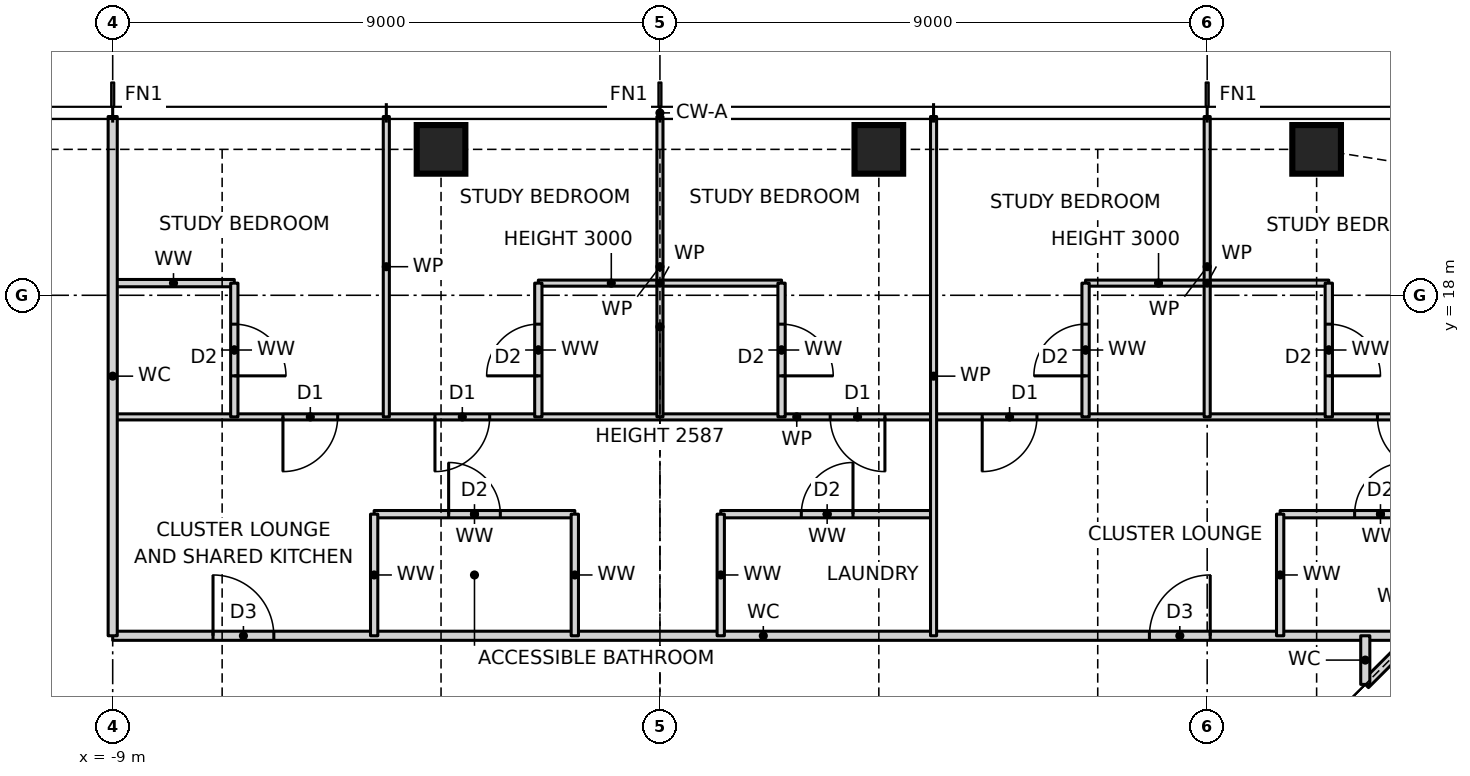
"""IFC4 building model, lengths in metres.
Left out: names, types, materials, properties, quantities, classifications, styles, units other than length and angle.
Written with IfcOpenShell. Run it as: python <this file> out.ifc"""

import sys

from ifc_helpers import new_model, si_unit, direction, frame, frame_2d, origin, origin_2d, place, context, subcontext, project, spatial, rectangle, hollow_rectangle, extrude, element, fill, save


model = new_model("IFC4")
c1 = context("Model", 3, precision=1e-05, world=origin(), true_north=direction((0.0, 1.0)))
c2 = subcontext(c1, "Body", "Model", "MODEL_VIEW")
j1 = project(units=[si_unit("LENGTHUNIT", "METRE"), si_unit("PLANEANGLEUNIT", "RADIAN")], contexts=[c1])
p1 = place(None, origin())
s1 = spatial("IfcSite", under=j1, at=p1, CompositionType="ELEMENT")
p2 = place(p1, origin())
s2 = spatial("IfcBuilding", under=s1, at=p2, CompositionType="ELEMENT")
p3 = place(p2, frame((0.0, 0.0, 115.5)))
s3 = spatial("IfcBuildingStorey", under=s2, at=p3, CompositionType="ELEMENT", Elevation=115.5)
for number, where, z_axis, x_axis in (
    (1, (10.8, 20.4, 0.0), (0.0, 0.0, 1.0), (1.0, 0.0, 0.0)),
    (2, (3.6, 20.4, 0.0), (0.0, 0.0, 1.0), (1.0, 0.0, 0.0)),
    (3, (-3.6, 20.4, 0.0), (0.0, 0.0, 1.0), (1.0, 0.0, 0.0)),
):
    element("IfcColumn", number, at=place(p3, frame(where, z_axis=z_axis, x_axis=x_axis)), inside=s3, PredefinedType="COLUMN", context=c2, shape_type="SweptSolid", body=[
        extrude(hollow_rectangle(XDim=0.8, YDim=0.8, WallThickness=0.07, at=origin_2d()), origin(), (0.0, 0.0, 1.0), 3.5),
    ])
p4 = place(p3, frame((-9.0, 12.4, 0.0), z_axis=(0.0, 0.0, 1.0), x_axis=(1.0, 0.0, 0.0)))
e4 = element("IfcWall", 4, at=p4, inside=s3, PredefinedType="PARTITIONING", context=c2, shape_type="SweptSolid", body=[
    extrude(rectangle(XDim=21.4, YDim=0.15, at=frame_2d((10.7, 0.0))), origin(), (0.0, 0.0, 1.0), 3.27),
])
p5 = place(p4, frame((17.05, 0.0, 0.0)))
e5 = element("IfcOpeningElement", 5, at=p5, cuts=e4, PredefinedType="OPENING", context=c2, shape_type="SweptSolid", body=[
    extrude(rectangle(XDim=1.0, YDim=2.1, at=frame_2d((0.5, 1.05))), frame((0.0, 0.085, 0.0), z_axis=(0.0, -1.0, 0.0), x_axis=(1.0, 0.0, 0.0)), (0.0, 0.0, 1.0), 0.17),
])
p6 = place(p4, frame((1.65, 0.0, 0.0)))
e6 = element("IfcOpeningElement", 6, at=p6, cuts=e4, PredefinedType="OPENING", context=c2, shape_type="SweptSolid", body=[
    extrude(rectangle(XDim=1.0, YDim=2.1, at=frame_2d((0.5, 1.05))), frame((0.0, 0.085, 0.0), z_axis=(0.0, -1.0, 0.0), x_axis=(1.0, 0.0, 0.0)), (0.0, 0.0, 1.0), 0.17),
])
p7 = place(p3, frame((-4.7, 14.4, 0.0), z_axis=(0.0, 0.0, 1.0), x_axis=(1.0, 0.0, 0.0)))
e7 = element("IfcWall", 7, at=p7, inside=s3, PredefinedType="PARTITIONING", context=c2, shape_type="SweptSolid", body=[
    extrude(rectangle(XDim=3.3, YDim=0.12, at=frame_2d((1.65, 0.0))), origin(), (0.0, 0.0, 1.0), 3.27),
])
p8 = place(p7, frame((1.225, 0.0, 0.0)))
e8 = element("IfcOpeningElement", 8, at=p8, cuts=e7, PredefinedType="OPENING", context=c2, shape_type="SweptSolid", body=[
    extrude(rectangle(XDim=0.85, YDim=2.1, at=frame_2d((0.425, 1.05))), frame((0.0, 0.07, 0.0), z_axis=(0.0, -1.0, 0.0), x_axis=(1.0, 0.0, 0.0)), (0.0, 0.0, 1.0), 0.14),
])
p9 = place(p3, frame((1.0, 14.4, 0.0), z_axis=(0.0, 0.0, 1.0), x_axis=(1.0, 0.0, 0.0)))
e9 = element("IfcWall", 9, at=p9, inside=s3, PredefinedType="PARTITIONING", context=c2, shape_type="SweptSolid", body=[
    extrude(rectangle(XDim=3.5, YDim=0.12, at=frame_2d((1.75, 0.0))), origin(), (0.0, 0.0, 1.0), 3.27),
])
p10 = place(p9, frame((1.325, 0.0, 0.0)))
e10 = element("IfcOpeningElement", 10, at=p10, cuts=e9, PredefinedType="OPENING", context=c2, shape_type="SweptSolid", body=[
    extrude(rectangle(XDim=0.85, YDim=2.1, at=frame_2d((0.425, 1.05))), frame((0.0, 0.07, 0.0), z_axis=(0.0, -1.0, 0.0), x_axis=(1.0, 0.0, 0.0)), (0.0, 0.0, 1.0), 0.14),
])
p11 = place(p3, frame((10.2, 14.4, 0.0), z_axis=(0.0, 0.0, 1.0), x_axis=(1.0, 0.0, 0.0)))
e11 = element("IfcWall", 11, at=p11, inside=s3, PredefinedType="PARTITIONING", context=c2, shape_type="SweptSolid", body=[
    extrude(rectangle(XDim=3.3, YDim=0.12, at=frame_2d((1.65, 0.0))), origin(), (0.0, 0.0, 1.0), 3.27),
])
p12 = place(p11, frame((1.225, 0.0, 0.0)))
e12 = element("IfcOpeningElement", 12, at=p12, cuts=e11, PredefinedType="OPENING", context=c2, shape_type="SweptSolid", body=[
    extrude(rectangle(XDim=0.85, YDim=2.1, at=frame_2d((0.425, 1.05))), frame((0.0, 0.07, 0.0), z_axis=(0.0, -1.0, 0.0), x_axis=(1.0, 0.0, 0.0)), (0.0, 0.0, 1.0), 0.14),
])
p13 = place(p3, frame((-9.0, 16.0, 0.0), z_axis=(0.0, 0.0, 1.0), x_axis=(1.0, 0.0, 0.0)))
e13 = element("IfcWall", 13, at=p13, inside=s3, PredefinedType="PARTITIONING", context=c2, shape_type="SweptSolid", body=[
    extrude(rectangle(XDim=22.5, YDim=0.1, at=frame_2d((11.25, 0.0))), origin(), (0.0, 0.0, 1.0), 3.27),
])
p14 = place(p13, frame((20.8, 0.0, 0.0)))
e14 = element("IfcOpeningElement", 14, at=p14, cuts=e13, PredefinedType="OPENING", context=c2, shape_type="SweptSolid", body=[
    extrude(rectangle(XDim=0.9, YDim=2.1, at=frame_2d((0.45, 1.05))), frame((0.0, 0.06, 0.0), z_axis=(0.0, -1.0, 0.0), x_axis=(1.0, 0.0, 0.0)), (0.0, 0.0, 1.0), 0.12),
])
p15 = place(p13, frame((14.3, 0.0, 0.0)))
e15 = element("IfcOpeningElement", 15, at=p15, cuts=e13, PredefinedType="OPENING", context=c2, shape_type="SweptSolid", body=[
    extrude(rectangle(XDim=0.9, YDim=2.1, at=frame_2d((0.45, 1.05))), frame((0.0, 0.06, 0.0), z_axis=(0.0, -1.0, 0.0), x_axis=(1.0, 0.0, 0.0)), (0.0, 0.0, 1.0), 0.12),
])
p16 = place(p13, frame((11.8, 0.0, 0.0)))
e16 = element("IfcOpeningElement", 16, at=p16, cuts=e13, PredefinedType="OPENING", context=c2, shape_type="SweptSolid", body=[
    extrude(rectangle(XDim=0.9, YDim=2.1, at=frame_2d((0.45, 1.05))), frame((0.0, 0.06, 0.0), z_axis=(0.0, -1.0, 0.0), x_axis=(1.0, 0.0, 0.0)), (0.0, 0.0, 1.0), 0.12),
])
p17 = place(p13, frame((5.3, 0.0, 0.0)))
e17 = element("IfcOpeningElement", 17, at=p17, cuts=e13, PredefinedType="OPENING", context=c2, shape_type="SweptSolid", body=[
    extrude(rectangle(XDim=0.9, YDim=2.1, at=frame_2d((0.45, 1.05))), frame((0.0, 0.06, 0.0), z_axis=(0.0, -1.0, 0.0), x_axis=(1.0, 0.0, 0.0)), (0.0, 0.0, 1.0), 0.12),
])
p18 = place(p13, frame((2.8, 0.0, 0.0)))
e18 = element("IfcOpeningElement", 18, at=p18, cuts=e13, PredefinedType="OPENING", context=c2, shape_type="SweptSolid", body=[
    extrude(rectangle(XDim=0.9, YDim=2.1, at=frame_2d((0.45, 1.05))), frame((0.0, 0.06, 0.0), z_axis=(0.0, -1.0, 0.0), x_axis=(1.0, 0.0, 0.0)), (0.0, 0.0, 1.0), 0.12),
])
p19 = place(p3, frame((-9.0, 18.2, 0.0), z_axis=(0.0, 0.0, 1.0), x_axis=(1.0, 0.0, 0.0)))
e19 = element("IfcWall", 19, at=p19, inside=s3, PredefinedType="PARTITIONING", context=c2, shape_type="SweptSolid", body=[
    extrude(rectangle(XDim=2.0, YDim=0.12, at=frame_2d((1.0, 0.0))), origin(), (0.0, 0.0, 1.0), 3.27),
])
for number, where, z_axis, x_axis in (
    (20, (-2.0, 18.2, 0.0), (0.0, 0.0, 1.0), (1.0, 0.0, 0.0)),
    (21, (7.0, 18.2, 0.0), (0.0, 0.0, 1.0), (1.0, 0.0, 0.0)),
):
    element("IfcWall", number, at=place(p3, frame(where, z_axis=z_axis, x_axis=x_axis)), inside=s3, PredefinedType="PARTITIONING", context=c2, shape_type="SweptSolid", body=[
        extrude(rectangle(XDim=4.0, YDim=0.1, at=frame_2d((2.0, 0.0))), origin(), (0.0, 0.0, 1.0), 3.0),
    ])
p20 = place(p3, frame((11.6, 11.6, 0.0), z_axis=(0.0, 0.0, 1.0), x_axis=(0.707106781187, 0.707106781187, 0.0)))
e22 = element("IfcWall", 22, at=p20, inside=s3, PredefinedType="PARTITIONING", context=c2, shape_type="SweptSolid", body=[
    extrude(rectangle(XDim=2.687, YDim=0.15, at=frame_2d((1.343, 0.0))), origin(), (0.0, 0.0, 1.0), 2.343),
])
p21 = place(p3, frame((11.6, 11.6, 0.0), z_axis=(0.0, 0.0, 1.0), x_axis=(0.0, 1.0, 0.0)))
e23 = element("IfcWall", 23, at=p21, inside=s3, PredefinedType="PARTITIONING", context=c2, shape_type="SweptSolid", body=[
    extrude(rectangle(XDim=0.8, YDim=0.15, at=frame_2d((0.4, 0.0))), origin(), (0.0, 0.0, 1.0), 3.27),
])
p22 = place(p3, frame((11.0, 16.0, 0.0), z_axis=(0.0, 0.0, 1.0), x_axis=(0.0, 1.0, 0.0)))
e24 = element("IfcWall", 24, at=p22, inside=s3, PredefinedType="PARTITIONING", context=c2, shape_type="SweptSolid", body=[
    extrude(rectangle(XDim=2.2, YDim=0.12, at=frame_2d((1.1, 0.0))), origin(), (0.0, 0.0, 1.0), 3.27),
])
p23 = place(p22, frame((0.675, 0.0, 0.0)))
e25 = element("IfcOpeningElement", 25, at=p23, cuts=e24, PredefinedType="OPENING", context=c2, shape_type="SweptSolid", body=[
    extrude(rectangle(XDim=0.85, YDim=2.1, at=frame_2d((0.425, 1.05))), frame((0.0, 0.07, 0.0), z_axis=(0.0, -1.0, 0.0), x_axis=(1.0, 0.0, 0.0)), (0.0, 0.0, 1.0), 0.14),
])
p24 = place(p3, frame((10.2, 12.4, 0.0), z_axis=(0.0, 0.0, 1.0), x_axis=(0.0, 1.0, 0.0)))
e26 = element("IfcWall", 26, at=p24, inside=s3, PredefinedType="PARTITIONING", context=c2, shape_type="SweptSolid", body=[
    extrude(rectangle(XDim=2.0, YDim=0.12, at=frame_2d((1.0, 0.0))), origin(), (0.0, 0.0, 1.0), 3.27),
])
p25 = place(p3, frame((9.0, 16.0, 0.0), z_axis=(0.0, 0.0, 1.0), x_axis=(0.0, 1.0, 0.0)))
e27 = element("IfcWall", 27, at=p25, inside=s3, PredefinedType="PARTITIONING", context=c2, shape_type="SweptSolid", body=[
    extrude(rectangle(XDim=4.94, YDim=0.1, at=frame_2d((2.47, 0.0))), origin(), (0.0, 0.0, 1.0), 3.27),
])
p26 = place(p3, frame((7.0, 16.0, 0.0), z_axis=(0.0, 0.0, 1.0), x_axis=(0.0, 1.0, 0.0)))
e28 = element("IfcWall", 28, at=p26, inside=s3, PredefinedType="PARTITIONING", context=c2, shape_type="SweptSolid", body=[
    extrude(rectangle(XDim=2.2, YDim=0.12, at=frame_2d((1.1, 0.0))), origin(), (0.0, 0.0, 1.0), 3.27),
])
p27 = place(p26, frame((0.675, 0.0, 0.0)))
e29 = element("IfcOpeningElement", 29, at=p27, cuts=e28, PredefinedType="OPENING", context=c2, shape_type="SweptSolid", body=[
    extrude(rectangle(XDim=0.85, YDim=2.1, at=frame_2d((0.425, 1.05))), frame((0.0, 0.07, 0.0), z_axis=(0.0, -1.0, 0.0), x_axis=(1.0, 0.0, 0.0)), (0.0, 0.0, 1.0), 0.14),
])
p28 = place(p3, frame((4.5, 12.4, 0.0), z_axis=(0.0, 0.0, 1.0), x_axis=(0.0, 1.0, 0.0)))
e30 = element("IfcWall", 30, at=p28, inside=s3, PredefinedType="PARTITIONING", context=c2, shape_type="SweptSolid", body=[
    extrude(rectangle(XDim=8.54, YDim=0.1, at=frame_2d((4.27, 0.0))), origin(), (0.0, 0.0, 1.0), 3.27),
])
p29 = place(p3, frame((2.0, 16.0, 0.0), z_axis=(0.0, 0.0, 1.0), x_axis=(0.0, 1.0, 0.0)))
e31 = element("IfcWall", 31, at=p29, inside=s3, PredefinedType="PARTITIONING", context=c2, shape_type="SweptSolid", body=[
    extrude(rectangle(XDim=2.2, YDim=0.12, at=frame_2d((1.1, 0.0))), origin(), (0.0, 0.0, 1.0), 3.27),
])
p30 = place(p29, frame((0.675, 0.0, 0.0)))
e32 = element("IfcOpeningElement", 32, at=p30, cuts=e31, PredefinedType="OPENING", context=c2, shape_type="SweptSolid", body=[
    extrude(rectangle(XDim=0.85, YDim=2.1, at=frame_2d((0.425, 1.05))), frame((0.0, 0.07, 0.0), z_axis=(0.0, -1.0, 0.0), x_axis=(1.0, 0.0, 0.0)), (0.0, 0.0, 1.0), 0.14),
])
p31 = place(p3, frame((1.0, 12.4, 0.0), z_axis=(0.0, 0.0, 1.0), x_axis=(0.0, 1.0, 0.0)))
e33 = element("IfcWall", 33, at=p31, inside=s3, PredefinedType="PARTITIONING", context=c2, shape_type="SweptSolid", body=[
    extrude(rectangle(XDim=2.0, YDim=0.12, at=frame_2d((1.0, 0.0))), origin(), (0.0, 0.0, 1.0), 3.27),
])
p32 = place(p3, frame((0.0, 16.0, 0.0), z_axis=(0.0, 0.0, 1.0), x_axis=(0.0, 1.0, 0.0)))
e34 = element("IfcWall", 34, at=p32, inside=s3, PredefinedType="PARTITIONING", context=c2, shape_type="SweptSolid", body=[
    extrude(rectangle(XDim=4.94, YDim=0.1, at=frame_2d((2.47, 0.0))), origin(), (0.0, 0.0, 1.0), 2.587),
])
p33 = place(p3, frame((-1.4, 12.4, 0.0), z_axis=(0.0, 0.0, 1.0), x_axis=(0.0, 1.0, 0.0)))
e35 = element("IfcWall", 35, at=p33, inside=s3, PredefinedType="PARTITIONING", context=c2, shape_type="SweptSolid", body=[
    extrude(rectangle(XDim=2.0, YDim=0.12, at=frame_2d((1.0, 0.0))), origin(), (0.0, 0.0, 1.0), 3.27),
])
p34 = place(p3, frame((-2.0, 16.0, 0.0), z_axis=(0.0, 0.0, 1.0), x_axis=(0.0, 1.0, 0.0)))
e36 = element("IfcWall", 36, at=p34, inside=s3, PredefinedType="PARTITIONING", context=c2, shape_type="SweptSolid", body=[
    extrude(rectangle(XDim=2.2, YDim=0.12, at=frame_2d((1.1, 0.0))), origin(), (0.0, 0.0, 1.0), 3.27),
])
p35 = place(p34, frame((0.675, 0.0, 0.0)))
e37 = element("IfcOpeningElement", 37, at=p35, cuts=e36, PredefinedType="OPENING", context=c2, shape_type="SweptSolid", body=[
    extrude(rectangle(XDim=0.85, YDim=2.1, at=frame_2d((0.425, 1.05))), frame((0.0, 0.07, 0.0), z_axis=(0.0, -1.0, 0.0), x_axis=(1.0, 0.0, 0.0)), (0.0, 0.0, 1.0), 0.14),
])
p36 = place(p3, frame((-4.5, 16.0, 0.0), z_axis=(0.0, 0.0, 1.0), x_axis=(0.0, 1.0, 0.0)))
e38 = element("IfcWall", 38, at=p36, inside=s3, PredefinedType="PARTITIONING", context=c2, shape_type="SweptSolid", body=[
    extrude(rectangle(XDim=4.94, YDim=0.1, at=frame_2d((2.47, 0.0))), origin(), (0.0, 0.0, 1.0), 3.27),
])
p37 = place(p3, frame((-4.7, 12.4, 0.0), z_axis=(0.0, 0.0, 1.0), x_axis=(0.0, 1.0, 0.0)))
e39 = element("IfcWall", 39, at=p37, inside=s3, PredefinedType="PARTITIONING", context=c2, shape_type="SweptSolid", body=[
    extrude(rectangle(XDim=2.0, YDim=0.12, at=frame_2d((1.0, 0.0))), origin(), (0.0, 0.0, 1.0), 3.27),
])
p38 = place(p3, frame((-7.0, 16.0, 0.0), z_axis=(0.0, 0.0, 1.0), x_axis=(0.0, 1.0, 0.0)))
e40 = element("IfcWall", 40, at=p38, inside=s3, PredefinedType="PARTITIONING", context=c2, shape_type="SweptSolid", body=[
    extrude(rectangle(XDim=2.2, YDim=0.12, at=frame_2d((1.1, 0.0))), origin(), (0.0, 0.0, 1.0), 3.27),
])
p39 = place(p38, frame((0.675, 0.0, 0.0)))
e41 = element("IfcOpeningElement", 41, at=p39, cuts=e40, PredefinedType="OPENING", context=c2, shape_type="SweptSolid", body=[
    extrude(rectangle(XDim=0.85, YDim=2.1, at=frame_2d((0.425, 1.05))), frame((0.0, 0.07, 0.0), z_axis=(0.0, -1.0, 0.0), x_axis=(1.0, 0.0, 0.0)), (0.0, 0.0, 1.0), 0.14),
])
p40 = place(p3, frame((-9.0, 12.4, 0.0), z_axis=(0.0, 0.0, 1.0), x_axis=(0.0, 1.0, 0.0)))
e42 = element("IfcWall", 42, at=p40, inside=s3, PredefinedType="PARTITIONING", context=c2, shape_type="SweptSolid", body=[
    extrude(rectangle(XDim=8.54, YDim=0.15, at=frame_2d((4.27, 0.0))), origin(), (0.0, 0.0, 1.0), 3.27),
])
p41 = place(p23, frame((0.85, 0.0, 0.0), z_axis=(0.0, 0.0, 1.0), x_axis=(-1.0, 0.0, 0.0)))
e43 = element("IfcDoor", 43, at=p41, inside=s3, OperationType="SINGLE_SWING_RIGHT", PredefinedType="DOOR", context=c2, shape_type="SweptSolid", body=[
    extrude(rectangle(XDim=0.85, YDim=2.1, at=frame_2d((0.425, 1.05))), frame((0.0, 0.025, 0.0), z_axis=(0.0, -1.0, 0.0), x_axis=(1.0, 0.0, 0.0)), (0.0, 0.0, 1.0), 0.05),
])
fill(e25, e43)
p42 = place(p14, frame((0.9, 0.0, 0.0), z_axis=(0.0, 0.0, 1.0), x_axis=(-1.0, 0.0, 0.0)))
e44 = element("IfcDoor", 44, at=p42, inside=s3, OperationType="SINGLE_SWING_LEFT", PredefinedType="DOOR", context=c2, shape_type="SweptSolid", body=[
    extrude(rectangle(XDim=0.9, YDim=2.1, at=frame_2d((0.45, 1.05))), frame((0.0, 0.025, 0.0), z_axis=(0.0, -1.0, 0.0), x_axis=(1.0, 0.0, 0.0)), (0.0, 0.0, 1.0), 0.05),
])
fill(e14, e44)
p43 = place(p27, origin())
e45 = element("IfcDoor", 45, at=p43, inside=s3, OperationType="SINGLE_SWING_LEFT", PredefinedType="DOOR", context=c2, shape_type="SweptSolid", body=[
    extrude(rectangle(XDim=0.85, YDim=2.1, at=frame_2d((0.425, 1.05))), frame((0.0, 0.025, 0.0), z_axis=(0.0, -1.0, 0.0), x_axis=(1.0, 0.0, 0.0)), (0.0, 0.0, 1.0), 0.05),
])
fill(e29, e45)
p44 = place(p15, frame((0.9, 0.0, 0.0), z_axis=(0.0, 0.0, 1.0), x_axis=(-1.0, 0.0, 0.0)))
e46 = element("IfcDoor", 46, at=p44, inside=s3, OperationType="SINGLE_SWING_RIGHT", PredefinedType="DOOR", context=c2, shape_type="SweptSolid", body=[
    extrude(rectangle(XDim=0.9, YDim=2.1, at=frame_2d((0.45, 1.05))), frame((0.0, 0.025, 0.0), z_axis=(0.0, -1.0, 0.0), x_axis=(1.0, 0.0, 0.0)), (0.0, 0.0, 1.0), 0.05),
])
fill(e15, e46)
p45 = place(p5, origin())
e47 = element("IfcDoor", 47, at=p45, inside=s3, OperationType="SINGLE_SWING_RIGHT", PredefinedType="DOOR", context=c2, shape_type="SweptSolid", body=[
    extrude(rectangle(XDim=1.0, YDim=2.1, at=frame_2d((0.5, 1.05))), frame((0.0, 0.025, 0.0), z_axis=(0.0, -1.0, 0.0), x_axis=(1.0, 0.0, 0.0)), (0.0, 0.0, 1.0), 0.05),
])
fill(e5, e47)
p46 = place(p12, origin())
e48 = element("IfcDoor", 48, at=p46, inside=s3, OperationType="SINGLE_SWING_RIGHT", PredefinedType="DOOR", context=c2, shape_type="SweptSolid", body=[
    extrude(rectangle(XDim=0.85, YDim=2.1, at=frame_2d((0.425, 1.05))), frame((0.0, 0.025, 0.0), z_axis=(0.0, -1.0, 0.0), x_axis=(1.0, 0.0, 0.0)), (0.0, 0.0, 1.0), 0.05),
])
fill(e12, e48)
p47 = place(p30, frame((0.85, 0.0, 0.0), z_axis=(0.0, 0.0, 1.0), x_axis=(-1.0, 0.0, 0.0)))
e49 = element("IfcDoor", 49, at=p47, inside=s3, OperationType="SINGLE_SWING_RIGHT", PredefinedType="DOOR", context=c2, shape_type="SweptSolid", body=[
    extrude(rectangle(XDim=0.85, YDim=2.1, at=frame_2d((0.425, 1.05))), frame((0.0, 0.025, 0.0), z_axis=(0.0, -1.0, 0.0), x_axis=(1.0, 0.0, 0.0)), (0.0, 0.0, 1.0), 0.05),
])
fill(e32, e49)
p48 = place(p16, frame((0.9, 0.0, 0.0), z_axis=(0.0, 0.0, 1.0), x_axis=(-1.0, 0.0, 0.0)))
e50 = element("IfcDoor", 50, at=p48, inside=s3, OperationType="SINGLE_SWING_LEFT", PredefinedType="DOOR", context=c2, shape_type="SweptSolid", body=[
    extrude(rectangle(XDim=0.9, YDim=2.1, at=frame_2d((0.45, 1.05))), frame((0.0, 0.025, 0.0), z_axis=(0.0, -1.0, 0.0), x_axis=(1.0, 0.0, 0.0)), (0.0, 0.0, 1.0), 0.05),
])
fill(e16, e50)
p49 = place(p35, origin())
e51 = element("IfcDoor", 51, at=p49, inside=s3, OperationType="SINGLE_SWING_LEFT", PredefinedType="DOOR", context=c2, shape_type="SweptSolid", body=[
    extrude(rectangle(XDim=0.85, YDim=2.1, at=frame_2d((0.425, 1.05))), frame((0.0, 0.025, 0.0), z_axis=(0.0, -1.0, 0.0), x_axis=(1.0, 0.0, 0.0)), (0.0, 0.0, 1.0), 0.05),
])
fill(e37, e51)
p50 = place(p17, frame((0.9, 0.0, 0.0), z_axis=(0.0, 0.0, 1.0), x_axis=(-1.0, 0.0, 0.0)))
e52 = element("IfcDoor", 52, at=p50, inside=s3, OperationType="SINGLE_SWING_RIGHT", PredefinedType="DOOR", context=c2, shape_type="SweptSolid", body=[
    extrude(rectangle(XDim=0.9, YDim=2.1, at=frame_2d((0.45, 1.05))), frame((0.0, 0.025, 0.0), z_axis=(0.0, -1.0, 0.0), x_axis=(1.0, 0.0, 0.0)), (0.0, 0.0, 1.0), 0.05),
])
fill(e17, e52)
p51 = place(p39, frame((0.85, 0.0, 0.0), z_axis=(0.0, 0.0, 1.0), x_axis=(-1.0, 0.0, 0.0)))
e53 = element("IfcDoor", 53, at=p51, inside=s3, OperationType="SINGLE_SWING_RIGHT", PredefinedType="DOOR", context=c2, shape_type="SweptSolid", body=[
    extrude(rectangle(XDim=0.85, YDim=2.1, at=frame_2d((0.425, 1.05))), frame((0.0, 0.025, 0.0), z_axis=(0.0, -1.0, 0.0), x_axis=(1.0, 0.0, 0.0)), (0.0, 0.0, 1.0), 0.05),
])
fill(e41, e53)
p52 = place(p18, frame((0.9, 0.0, 0.0), z_axis=(0.0, 0.0, 1.0), x_axis=(-1.0, 0.0, 0.0)))
e54 = element("IfcDoor", 54, at=p52, inside=s3, OperationType="SINGLE_SWING_RIGHT", PredefinedType="DOOR", context=c2, shape_type="SweptSolid", body=[
    extrude(rectangle(XDim=0.9, YDim=2.1, at=frame_2d((0.45, 1.05))), frame((0.0, 0.025, 0.0), z_axis=(0.0, -1.0, 0.0), x_axis=(1.0, 0.0, 0.0)), (0.0, 0.0, 1.0), 0.05),
])
fill(e18, e54)
p53 = place(p6, origin())
e55 = element("IfcDoor", 55, at=p53, inside=s3, OperationType="SINGLE_SWING_LEFT", PredefinedType="DOOR", context=c2, shape_type="SweptSolid", body=[
    extrude(rectangle(XDim=1.0, YDim=2.1, at=frame_2d((0.5, 1.05))), frame((0.0, 0.025, 0.0), z_axis=(0.0, -1.0, 0.0), x_axis=(1.0, 0.0, 0.0)), (0.0, 0.0, 1.0), 0.05),
])
fill(e6, e55)
p54 = place(p10, origin())
e56 = element("IfcDoor", 56, at=p54, inside=s3, OperationType="SINGLE_SWING_RIGHT", PredefinedType="DOOR", context=c2, shape_type="SweptSolid", body=[
    extrude(rectangle(XDim=0.85, YDim=2.1, at=frame_2d((0.425, 1.05))), frame((0.0, 0.025, 0.0), z_axis=(0.0, -1.0, 0.0), x_axis=(1.0, 0.0, 0.0)), (0.0, 0.0, 1.0), 0.05),
])
fill(e10, e56)
p55 = place(p8, origin())
e57 = element("IfcDoor", 57, at=p55, inside=s3, OperationType="SINGLE_SWING_LEFT", PredefinedType="DOOR", context=c2, shape_type="SweptSolid", body=[
    extrude(rectangle(XDim=0.85, YDim=2.1, at=frame_2d((0.425, 1.05))), frame((0.0, 0.025, 0.0), z_axis=(0.0, -1.0, 0.0), x_axis=(1.0, 0.0, 0.0)), (0.0, 0.0, 1.0), 0.05),
])
fill(e8, e57)
save(model, sys.argv[1])
